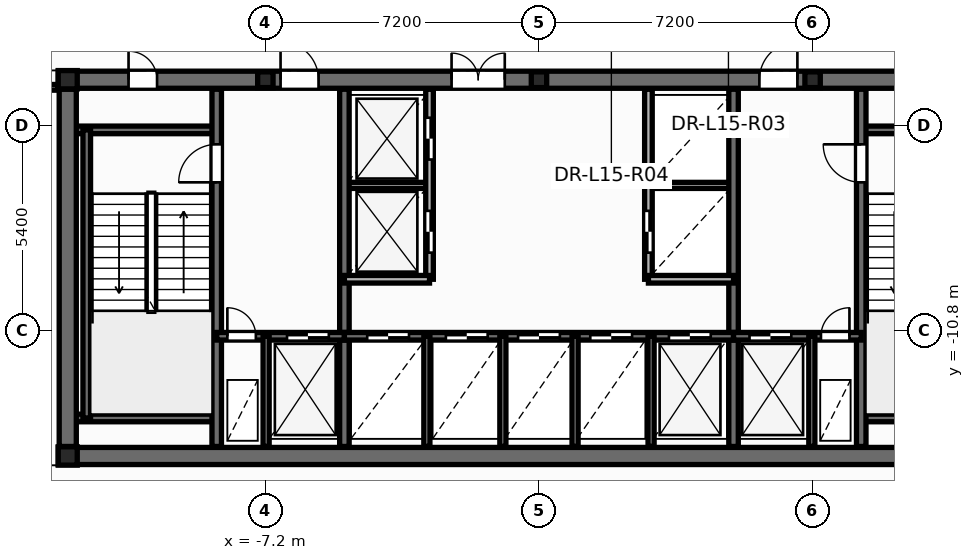
"""IFC4 building model, lengths in metres.
Left out: names, types, materials, properties, quantities, classifications, styles, units other than length and angle.
Written with IfcOpenShell. Run it as: python <this file> out.ifc"""

import sys

from ifc_helpers import new_model, si_unit, direction, frame, frame_2d, origin, origin_2d, place, context, subcontext, project, spatial, rectangle, i_section, extrude, element, fill, save


model = new_model("IFC4")
c1 = context("Model", 3, precision=1e-05, world=origin(), true_north=direction((0.0, 1.0)))
c2 = subcontext(c1, "Body", "Model", "MODEL_VIEW")
j1 = project(units=[si_unit("LENGTHUNIT", "METRE"), si_unit("PLANEANGLEUNIT", "RADIAN")], contexts=[c1])
p1 = place(None, origin())
s1 = spatial("IfcSite", under=j1, at=p1, CompositionType="ELEMENT")
p2 = place(p1, origin())
s2 = spatial("IfcBuilding", under=s1, at=p2, CompositionType="ELEMENT")
p3 = place(p2, frame((0.0, 0.0, 60.3)))
s3 = spatial("IfcBuildingStorey", under=s2, at=p3, CompositionType="ELEMENT", Elevation=60.3)
for number, where, z_axis, x_axis in (
    (1, (-12.4, -14.1, 0.0), (0.0, 0.0, 1.0), (1.0, 0.0, 0.0)),
    (2, (-12.4, -4.2, 0.0), (0.0, 0.0, 1.0), (1.0, 0.0, 0.0)),
):
    element("IfcColumn", number, at=place(p3, frame(where, z_axis=z_axis, x_axis=x_axis)), inside=s3, PredefinedType="COLUMN", context=c2, shape_type="SweptSolid", body=[
        extrude(i_section(OverallWidth=0.5, OverallDepth=0.482, WebThickness=0.04, FlangeThickness=0.045, at=origin_2d()), origin(), (0.0, 0.0, 1.0), 4.5),
    ])
for number, where, z_axis, x_axis in (
    (3, (-7.2, -4.2, 0.0), (0.0, 0.0, 1.0), (1.0, 0.0, 0.0)),
    (4, (0.0, -4.2, 0.0), (0.0, 0.0, 1.0), (1.0, 0.0, 0.0)),
    (5, (7.2, -4.2, 0.0), (0.0, 0.0, 1.0), (1.0, 0.0, 0.0)),
):
    element("IfcColumn", number, at=place(p3, frame(where, z_axis=z_axis, x_axis=x_axis)), inside=s3, PredefinedType="PILASTER", context=c2, shape_type="SweptSolid", body=[
        extrude(i_section(OverallWidth=0.405, OverallDepth=0.414, WebThickness=0.022, FlangeThickness=0.032, at=origin_2d()), origin(), (0.0, 0.0, 1.0), 4.5),
    ])
for number, where, z_axis, x_axis in (
    (6, (-5.12, -6.98, 0.0), (0.0, 0.0, 1.0), (1.0, 0.0, 0.0)),
    (7, (2.88, -6.98, 0.0), (0.0, 0.0, 1.0), (1.0, 0.0, 0.0)),
):
    element("IfcWall", number, at=place(p3, frame(where, z_axis=z_axis, x_axis=x_axis)), inside=s3, PredefinedType="PARTITIONING", context=c2, shape_type="SweptSolid", body=[
        extrude(rectangle(XDim=2.24, YDim=0.16, at=frame_2d((1.12, 0.0))), origin(), (0.0, 0.0, 1.0), 4.25),
    ])
p4 = place(p3, frame((-12.65, -14.1, 0.0), z_axis=(0.0, 0.0, 1.0), x_axis=(1.0, 0.0, 0.0)))
e8 = element("IfcWall", 8, at=p4, inside=s3, PredefinedType="SHEAR", context=c2, shape_type="SweptSolid", body=[
    extrude(rectangle(XDim=25.3, YDim=0.45, at=frame_2d((12.65, 0.0))), origin(), (0.0, 0.0, 1.0), 4.5),
])
p5 = place(p3, frame((-12.65, -4.2, 0.0), z_axis=(0.0, 0.0, 1.0), x_axis=(1.0, 0.0, 0.0)))
e9 = element("IfcWall", 9, at=p5, inside=s3, PredefinedType="SHEAR", context=c2, shape_type="SweptSolid", body=[
    extrude(rectangle(XDim=25.3, YDim=0.45, at=frame_2d((12.65, 0.0))), origin(), (0.0, 0.0, 1.0), 4.5),
])
p6 = place(p5, frame((1.85, 0.0, 0.0)))
e10 = element("IfcOpeningElement", 10, at=p6, cuts=e9, PredefinedType="OPENING", context=c2, shape_type="SweptSolid", body=[
    extrude(rectangle(XDim=0.756, YDim=2.054, at=frame_2d((0.375, 1.027))), frame((0.0, 0.235, 0.0), z_axis=(0.0, -1.0, 0.0), x_axis=(1.0, 0.0, 0.0)), (0.0, 0.0, 1.0), 0.47),
])
p7 = place(p5, frame((22.65, 0.0, 0.0)))
e11 = element("IfcOpeningElement", 11, at=p7, cuts=e9, PredefinedType="OPENING", context=c2, shape_type="SweptSolid", body=[
    extrude(rectangle(XDim=0.756, YDim=2.054, at=frame_2d((0.375, 1.027))), frame((0.0, 0.235, 0.0), z_axis=(0.0, -1.0, 0.0), x_axis=(1.0, 0.0, 0.0)), (0.0, 0.0, 1.0), 0.47),
])
p8 = place(p5, frame((5.85, 0.0, 0.0)))
e12 = element("IfcOpeningElement", 12, at=p8, cuts=e9, PredefinedType="OPENING", context=c2, shape_type="SweptSolid", body=[
    extrude(rectangle(XDim=1.006, YDim=2.104, at=frame_2d((0.5, 1.052))), frame((0.0, 0.235, 0.0), z_axis=(0.0, -1.0, 0.0), x_axis=(1.0, 0.0, 0.0)), (0.0, 0.0, 1.0), 0.47),
])
p9 = place(p5, frame((10.35, 0.0, 0.0)))
e13 = element("IfcOpeningElement", 13, at=p9, cuts=e9, PredefinedType="OPENING", context=c2, shape_type="SweptSolid", body=[
    extrude(rectangle(XDim=1.406, YDim=2.154, at=frame_2d((0.7, 1.077))), frame((0.0, 0.235, 0.0), z_axis=(0.0, -1.0, 0.0), x_axis=(1.0, 0.0, 0.0)), (0.0, 0.0, 1.0), 0.47),
])
p10 = place(p5, frame((18.45, 0.0, 0.0)))
e14 = element("IfcOpeningElement", 14, at=p10, cuts=e9, PredefinedType="OPENING", context=c2, shape_type="SweptSolid", body=[
    extrude(rectangle(XDim=1.006, YDim=2.104, at=frame_2d((0.5, 1.052))), frame((0.0, 0.235, 0.0), z_axis=(0.0, -1.0, 0.0), x_axis=(1.0, 0.0, 0.0)), (0.0, 0.0, 1.0), 0.47),
])
for number, where, z_axis, x_axis in (
    (15, (-12.35, -5.52, 0.0), (0.0, 0.0, 1.0), (1.0, 0.0, 0.0)),
    (16, (-12.35, -13.1, 0.0), (0.0, 0.0, 1.0), (1.0, 0.0, 0.0)),
):
    element("IfcWall", number, at=place(p3, frame(where, z_axis=z_axis, x_axis=x_axis)), inside=s3, PredefinedType="SOLIDWALL", context=c2, shape_type="SweptSolid", body=[
        extrude(rectangle(XDim=3.87, YDim=0.2, at=frame_2d((1.935, 0.0))), origin(), (0.0, 0.0, 1.0), 4.5),
    ])
p11 = place(p3, frame((-11.9, -13.1, 0.0), z_axis=(0.0, 0.0, 1.0), x_axis=(0.0, 1.0, 0.0)))
e17 = element("IfcWall", 17, at=p11, inside=s3, PredefinedType="SOLIDWALL", context=c2, shape_type="SweptSolid", body=[
    extrude(rectangle(XDim=7.58, YDim=0.2, at=frame_2d((3.79, 0.0))), origin(), (0.0, 0.0, 1.0), 4.5),
])
for number, where, z_axis, x_axis in (
    (18, (8.48, -5.52, 0.0), (0.0, 0.0, 1.0), (1.0, 0.0, 0.0)),
    (19, (8.48, -13.1, 0.0), (0.0, 0.0, 1.0), (1.0, 0.0, 0.0)),
):
    element("IfcWall", number, at=place(p3, frame(where, z_axis=z_axis, x_axis=x_axis)), inside=s3, PredefinedType="SOLIDWALL", context=c2, shape_type="SweptSolid", body=[
        extrude(rectangle(XDim=3.87, YDim=0.2, at=frame_2d((1.935, 0.0))), origin(), (0.0, 0.0, 1.0), 4.5),
    ])
p12 = place(p3, frame((-8.48, -13.85, 0.0), z_axis=(0.0, 0.0, 1.0), x_axis=(0.0, 1.0, 0.0)))
e20 = element("IfcWall", 20, at=p12, inside=s3, PredefinedType="SHEAR", context=c2, shape_type="SweptSolid", body=[
    extrude(rectangle(XDim=9.4, YDim=0.25, at=frame_2d((4.7, 0.0))), origin(), (0.0, 0.0, 1.0), 4.5),
])
p13 = place(p12, frame((6.95, 0.0, 0.0)))
e21 = element("IfcOpeningElement", 21, at=p13, cuts=e20, PredefinedType="OPENING", context=c2, shape_type="SweptSolid", body=[
    extrude(rectangle(XDim=1.006, YDim=2.104, at=frame_2d((0.5, 1.052))), frame((0.0, 0.135, 0.0), z_axis=(0.0, -1.0, 0.0), x_axis=(1.0, 0.0, 0.0)), (0.0, 0.0, 1.0), 0.27),
])
p14 = place(p3, frame((8.48, -13.85, 0.0), z_axis=(0.0, 0.0, 1.0), x_axis=(0.0, 1.0, 0.0)))
e22 = element("IfcWall", 22, at=p14, inside=s3, PredefinedType="SHEAR", context=c2, shape_type="SweptSolid", body=[
    extrude(rectangle(XDim=9.4, YDim=0.25, at=frame_2d((4.7, 0.0))), origin(), (0.0, 0.0, 1.0), 4.5),
])
p15 = place(p14, frame((6.95, 0.0, 0.0)))
e23 = element("IfcOpeningElement", 23, at=p15, cuts=e22, PredefinedType="OPENING", context=c2, shape_type="SweptSolid", body=[
    extrude(rectangle(XDim=1.006, YDim=2.104, at=frame_2d((0.5, 1.052))), frame((0.0, 0.135, 0.0), z_axis=(0.0, -1.0, 0.0), x_axis=(1.0, 0.0, 0.0)), (0.0, 0.0, 1.0), 0.27),
])
for number, where, z_axis, x_axis in (
    (24, (-5.12, -13.85, 0.0), (0.0, 0.0, 1.0), (0.0, 1.0, 0.0)),
    (25, (5.12, -13.85, 0.0), (0.0, 0.0, 1.0), (0.0, 1.0, 0.0)),
):
    element("IfcWall", number, at=place(p3, frame(where, z_axis=z_axis, x_axis=x_axis)), inside=s3, PredefinedType="SHEAR", context=c2, shape_type="SweptSolid", body=[
        extrude(rectangle(XDim=9.4, YDim=0.25, at=frame_2d((4.7, 0.0))), origin(), (0.0, 0.0, 1.0), 4.5),
    ])
p16 = place(p3, frame((-8.48, -10.95, 0.0), z_axis=(0.0, 0.0, 1.0), x_axis=(1.0, 0.0, 0.0)))
e26 = element("IfcWall", 26, at=p16, inside=s3, PredefinedType="SOLIDWALL", context=c2, shape_type="SweptSolid", body=[
    extrude(rectangle(XDim=3.36, YDim=0.2, at=frame_2d((1.68, 0.0))), origin(), (0.0, 0.0, 1.0), 4.5),
])
p17 = place(p16, frame((0.28, 0.0, 0.0)))
e27 = element("IfcOpeningElement", 27, at=p17, cuts=e26, PredefinedType="OPENING", context=c2, shape_type="SweptSolid", body=[
    extrude(rectangle(XDim=0.756, YDim=2.054, at=frame_2d((0.375, 1.027))), frame((0.0, 0.11, 0.0), z_axis=(0.0, -1.0, 0.0), x_axis=(1.0, 0.0, 0.0)), (0.0, 0.0, 1.0), 0.22),
])
p18 = place(p16, frame((1.85, 0.0, 0.0)))
e28 = element("IfcOpeningElement", 28, at=p18, cuts=e26, PredefinedType="OPENING", context=c2, shape_type="SweptSolid", body=[
    extrude(rectangle(XDim=1.106, YDim=2.104, at=frame_2d((0.55, 1.052))), frame((0.0, 0.11, 0.0), z_axis=(0.0, -1.0, 0.0), x_axis=(1.0, 0.0, 0.0)), (0.0, 0.0, 1.0), 0.22),
])
p19 = place(p3, frame((-5.12, -10.95, 0.0), z_axis=(0.0, 0.0, 1.0), x_axis=(1.0, 0.0, 0.0)))
e29 = element("IfcWall", 29, at=p19, inside=s3, PredefinedType="SOLIDWALL", context=c2, shape_type="SweptSolid", body=[
    extrude(rectangle(XDim=10.24, YDim=0.2, at=frame_2d((5.12, 0.0))), origin(), (0.0, 0.0, 1.0), 4.5),
])
p20 = place(p19, frame((0.6, 0.0, 0.0)))
e30 = element("IfcOpeningElement", 30, at=p20, cuts=e29, PredefinedType="OPENING", context=c2, shape_type="SweptSolid", body=[
    extrude(rectangle(XDim=1.106, YDim=2.104, at=frame_2d((0.55, 1.052))), frame((0.0, 0.11, 0.0), z_axis=(0.0, -1.0, 0.0), x_axis=(1.0, 0.0, 0.0)), (0.0, 0.0, 1.0), 0.22),
])
p21 = place(p19, frame((2.67, 0.0, 0.0)))
e31 = element("IfcOpeningElement", 31, at=p21, cuts=e29, PredefinedType="OPENING", context=c2, shape_type="SweptSolid", body=[
    extrude(rectangle(XDim=1.106, YDim=2.104, at=frame_2d((0.55, 1.052))), frame((0.0, 0.11, 0.0), z_axis=(0.0, -1.0, 0.0), x_axis=(1.0, 0.0, 0.0)), (0.0, 0.0, 1.0), 0.22),
])
p22 = place(p19, frame((4.57, 0.0, 0.0)))
e32 = element("IfcOpeningElement", 32, at=p22, cuts=e29, PredefinedType="OPENING", context=c2, shape_type="SweptSolid", body=[
    extrude(rectangle(XDim=1.106, YDim=2.104, at=frame_2d((0.55, 1.052))), frame((0.0, 0.11, 0.0), z_axis=(0.0, -1.0, 0.0), x_axis=(1.0, 0.0, 0.0)), (0.0, 0.0, 1.0), 0.22),
])
p23 = place(p19, frame((6.47, 0.0, 0.0)))
e33 = element("IfcOpeningElement", 33, at=p23, cuts=e29, PredefinedType="OPENING", context=c2, shape_type="SweptSolid", body=[
    extrude(rectangle(XDim=1.106, YDim=2.104, at=frame_2d((0.55, 1.052))), frame((0.0, 0.11, 0.0), z_axis=(0.0, -1.0, 0.0), x_axis=(1.0, 0.0, 0.0)), (0.0, 0.0, 1.0), 0.22),
])
p24 = place(p19, frame((8.54, 0.0, 0.0)))
e34 = element("IfcOpeningElement", 34, at=p24, cuts=e29, PredefinedType="OPENING", context=c2, shape_type="SweptSolid", body=[
    extrude(rectangle(XDim=1.106, YDim=2.104, at=frame_2d((0.55, 1.052))), frame((0.0, 0.11, 0.0), z_axis=(0.0, -1.0, 0.0), x_axis=(1.0, 0.0, 0.0)), (0.0, 0.0, 1.0), 0.22),
])
p25 = place(p3, frame((5.12, -10.95, 0.0), z_axis=(0.0, 0.0, 1.0), x_axis=(1.0, 0.0, 0.0)))
e35 = element("IfcWall", 35, at=p25, inside=s3, PredefinedType="SOLIDWALL", context=c2, shape_type="SweptSolid", body=[
    extrude(rectangle(XDim=3.36, YDim=0.2, at=frame_2d((1.68, 0.0))), origin(), (0.0, 0.0, 1.0), 4.5),
])
p26 = place(p25, frame((0.42, 0.0, 0.0)))
e36 = element("IfcOpeningElement", 36, at=p26, cuts=e35, PredefinedType="OPENING", context=c2, shape_type="SweptSolid", body=[
    extrude(rectangle(XDim=1.106, YDim=2.104, at=frame_2d((0.55, 1.052))), frame((0.0, 0.11, 0.0), z_axis=(0.0, -1.0, 0.0), x_axis=(1.0, 0.0, 0.0)), (0.0, 0.0, 1.0), 0.22),
])
p27 = place(p25, frame((2.3, 0.0, 0.0)))
e37 = element("IfcOpeningElement", 37, at=p27, cuts=e35, PredefinedType="OPENING", context=c2, shape_type="SweptSolid", body=[
    extrude(rectangle(XDim=0.756, YDim=2.054, at=frame_2d((0.375, 1.027))), frame((0.0, 0.11, 0.0), z_axis=(0.0, -1.0, 0.0), x_axis=(1.0, 0.0, 0.0)), (0.0, 0.0, 1.0), 0.22),
])
for number, where, z_axis, x_axis in (
    (38, (-7.18, -13.85, 0.0), (0.0, 0.0, 1.0), (0.0, 1.0, 0.0)),
    (39, (7.18, -13.85, 0.0), (0.0, 0.0, 1.0), (0.0, 1.0, 0.0)),
    (40, (-2.95, -13.85, 0.0), (0.0, 0.0, 1.0), (0.0, 1.0, 0.0)),
    (41, (2.95, -13.85, 0.0), (0.0, 0.0, 1.0), (0.0, 1.0, 0.0)),
):
    element("IfcWall", number, at=place(p3, frame(where, z_axis=z_axis, x_axis=x_axis)), inside=s3, PredefinedType="PARTITIONING", context=c2, shape_type="SweptSolid", body=[
        extrude(rectangle(XDim=2.9, YDim=0.16, at=frame_2d((1.45, 0.0))), origin(), (0.0, 0.0, 1.0), 3.275),
    ])
p28 = place(p3, frame((-12.4, -13.85, 0.0), z_axis=(0.0, 0.0, 1.0), x_axis=(0.0, 1.0, 0.0)))
e42 = element("IfcWall", 42, at=p28, inside=s3, PredefinedType="SHEAR", context=c2, shape_type="SweptSolid", body=[
    extrude(rectangle(XDim=9.4, YDim=0.45, at=frame_2d((4.7, 0.0))), origin(), (0.0, 0.0, 1.0), 4.5),
])
p29 = place(p3, frame((-2.88, -9.45, 0.0), z_axis=(0.0, 0.0, 1.0), x_axis=(0.0, 1.0, 0.0)))
e43 = element("IfcWall", 43, at=p29, inside=s3, PredefinedType="SOLIDWALL", context=c2, shape_type="SweptSolid", body=[
    extrude(rectangle(XDim=5.0, YDim=0.2, at=frame_2d((2.5, 0.0))), origin(), (0.0, 0.0, 1.0), 4.25),
])
p30 = place(p29, frame((0.7, 0.0, 0.0)))
e44 = element("IfcOpeningElement", 44, at=p30, cuts=e43, PredefinedType="OPENING", context=c2, shape_type="SweptSolid", body=[
    extrude(rectangle(XDim=1.106, YDim=2.104, at=frame_2d((0.55, 1.052))), frame((0.0, 0.11, 0.0), z_axis=(0.0, -1.0, 0.0), x_axis=(1.0, 0.0, 0.0)), (0.0, 0.0, 1.0), 0.22),
])
p31 = place(p29, frame((3.15, 0.0, 0.0)))
e45 = element("IfcOpeningElement", 45, at=p31, cuts=e43, PredefinedType="OPENING", context=c2, shape_type="SweptSolid", body=[
    extrude(rectangle(XDim=1.106, YDim=2.104, at=frame_2d((0.55, 1.052))), frame((0.0, 0.11, 0.0), z_axis=(0.0, -1.0, 0.0), x_axis=(1.0, 0.0, 0.0)), (0.0, 0.0, 1.0), 0.22),
])
p32 = place(p3, frame((-5.12, -9.45, 0.0), z_axis=(0.0, 0.0, 1.0), x_axis=(1.0, 0.0, 0.0)))
e46 = element("IfcWall", 46, at=p32, inside=s3, PredefinedType="SOLIDWALL", context=c2, shape_type="SweptSolid", body=[
    extrude(rectangle(XDim=2.24, YDim=0.2, at=frame_2d((1.12, 0.0))), origin(), (0.0, 0.0, 1.0), 4.25),
])
p33 = place(p3, frame((2.88, -9.45, 0.0), z_axis=(0.0, 0.0, 1.0), x_axis=(0.0, 1.0, 0.0)))
e47 = element("IfcWall", 47, at=p33, inside=s3, PredefinedType="SOLIDWALL", context=c2, shape_type="SweptSolid", body=[
    extrude(rectangle(XDim=5.0, YDim=0.2, at=frame_2d((2.5, 0.0))), origin(), (0.0, 0.0, 1.0), 4.25),
])
p34 = place(p33, frame((0.7, 0.0, 0.0)))
e48 = element("IfcOpeningElement", 48, at=p34, cuts=e47, PredefinedType="OPENING", context=c2, shape_type="SweptSolid", body=[
    extrude(rectangle(XDim=1.106, YDim=2.104, at=frame_2d((0.55, 1.052))), frame((0.0, 0.11, 0.0), z_axis=(0.0, -1.0, 0.0), x_axis=(1.0, 0.0, 0.0)), (0.0, 0.0, 1.0), 0.22),
])
p35 = place(p3, frame((2.88, -9.45, 0.0), z_axis=(0.0, 0.0, 1.0), x_axis=(1.0, 0.0, 0.0)))
e49 = element("IfcWall", 49, at=p35, inside=s3, PredefinedType="SOLIDWALL", context=c2, shape_type="SweptSolid", body=[
    extrude(rectangle(XDim=2.24, YDim=0.2, at=frame_2d((1.12, 0.0))), origin(), (0.0, 0.0, 1.0), 4.25),
])
for number, where, z_axis, x_axis in (
    (50, (-0.95, -13.85, 0.0), (0.0, 0.0, 1.0), (0.0, 1.0, 0.0)),
    (51, (0.95, -13.85, 0.0), (0.0, 0.0, 1.0), (0.0, 1.0, 0.0)),
):
    element("IfcWall", number, at=place(p3, frame(where, z_axis=z_axis, x_axis=x_axis)), inside=s3, PredefinedType="PARTITIONING", context=c2, shape_type="SweptSolid", body=[
        extrude(rectangle(XDim=2.9, YDim=0.16, at=frame_2d((1.45, 0.0))), origin(), (0.0, 0.0, 1.0), 3.275),
    ])
p36 = place(p3, frame((-15.2, -4.4, 0.0), z_axis=(0.0, 0.0, 1.0), x_axis=(1.0, 0.0, 0.0)))
e52 = element("IfcWall", 52, at=p36, inside=s3, PredefinedType="PARTITIONING", context=c2, shape_type="SweptSolid", body=[
    extrude(rectangle(XDim=2.548, YDim=0.15, at=frame_2d((1.274, 0.0))), origin(), (0.0, 0.0, 1.0), 3.225),
])
p37 = place(p30, origin())
e53 = element("IfcDoor", 53, at=p37, inside=s3, OperationType="DOUBLE_DOOR_SLIDING", PredefinedType="DOOR", context=c2, shape_type="SweptSolid", body=[
    extrude(rectangle(XDim=1.1, YDim=2.1, at=frame_2d((0.55, 1.05))), frame((0.0, 0.025, 0.0), z_axis=(0.0, -1.0, 0.0), x_axis=(1.0, 0.0, 0.0)), (0.0, 0.0, 1.0), 0.05),
])
fill(e44, e53)
p38 = place(p31, origin())
e54 = element("IfcDoor", 54, at=p38, inside=s3, OperationType="DOUBLE_DOOR_SLIDING", PredefinedType="DOOR", context=c2, shape_type="SweptSolid", body=[
    extrude(rectangle(XDim=1.1, YDim=2.1, at=frame_2d((0.55, 1.05))), frame((0.0, 0.025, 0.0), z_axis=(0.0, -1.0, 0.0), x_axis=(1.0, 0.0, 0.0)), (0.0, 0.0, 1.0), 0.05),
])
fill(e45, e54)
p39 = place(p34, origin())
e55 = element("IfcDoor", 55, at=p39, inside=s3, OperationType="DOUBLE_DOOR_SLIDING", PredefinedType="DOOR", context=c2, shape_type="SweptSolid", body=[
    extrude(rectangle(XDim=1.1, YDim=2.1, at=frame_2d((0.55, 1.05))), frame((0.0, 0.025, 0.0), z_axis=(0.0, -1.0, 0.0), x_axis=(1.0, 0.0, 0.0)), (0.0, 0.0, 1.0), 0.05),
])
fill(e48, e55)
p40 = place(p13, origin())
e56 = element("IfcDoor", 56, at=p40, inside=s3, OperationType="SINGLE_SWING_LEFT", PredefinedType="DOOR", context=c2, shape_type="SweptSolid", body=[
    extrude(rectangle(XDim=1.0, YDim=2.1, at=frame_2d((0.5, 1.05))), frame((0.0, 0.025, 0.0), z_axis=(0.0, -1.0, 0.0), x_axis=(1.0, 0.0, 0.0)), (0.0, 0.0, 1.0), 0.05),
])
fill(e21, e56)
p41 = place(p15, origin())
e57 = element("IfcDoor", 57, at=p41, inside=s3, OperationType="SINGLE_SWING_RIGHT", PredefinedType="DOOR", context=c2, shape_type="SweptSolid", body=[
    extrude(rectangle(XDim=1.0, YDim=2.1, at=frame_2d((0.5, 1.05))), frame((0.0, 0.025, 0.0), z_axis=(0.0, -1.0, 0.0), x_axis=(1.0, 0.0, 0.0)), (0.0, 0.0, 1.0), 0.05),
])
fill(e23, e57)
p42 = place(p17, origin())
e58 = element("IfcDoor", 58, at=p42, inside=s3, OperationType="SINGLE_SWING_LEFT", PredefinedType="DOOR", context=c2, shape_type="SweptSolid", body=[
    extrude(rectangle(XDim=0.75, YDim=2.05, at=frame_2d((0.375, 1.025))), frame((0.0, 0.025, 0.0), z_axis=(0.0, -1.0, 0.0), x_axis=(1.0, 0.0, 0.0)), (0.0, 0.0, 1.0), 0.05),
])
fill(e27, e58)
p43 = place(p18, origin())
e59 = element("IfcDoor", 59, at=p43, inside=s3, OperationType="DOUBLE_DOOR_SLIDING", PredefinedType="DOOR", context=c2, shape_type="SweptSolid", body=[
    extrude(rectangle(XDim=1.1, YDim=2.1, at=frame_2d((0.55, 1.05))), frame((0.0, 0.025, 0.0), z_axis=(0.0, -1.0, 0.0), x_axis=(1.0, 0.0, 0.0)), (0.0, 0.0, 1.0), 0.05),
])
fill(e28, e59)
p44 = place(p26, origin())
e60 = element("IfcDoor", 60, at=p44, inside=s3, OperationType="DOUBLE_DOOR_SLIDING", PredefinedType="DOOR", context=c2, shape_type="SweptSolid", body=[
    extrude(rectangle(XDim=1.1, YDim=2.1, at=frame_2d((0.55, 1.05))), frame((0.0, 0.025, 0.0), z_axis=(0.0, -1.0, 0.0), x_axis=(1.0, 0.0, 0.0)), (0.0, 0.0, 1.0), 0.05),
])
fill(e36, e60)
p45 = place(p27, origin())
e61 = element("IfcDoor", 61, at=p45, inside=s3, OperationType="SINGLE_SWING_RIGHT", PredefinedType="DOOR", context=c2, shape_type="SweptSolid", body=[
    extrude(rectangle(XDim=0.75, YDim=2.05, at=frame_2d((0.375, 1.025))), frame((0.0, 0.025, 0.0), z_axis=(0.0, -1.0, 0.0), x_axis=(1.0, 0.0, 0.0)), (0.0, 0.0, 1.0), 0.05),
])
fill(e37, e61)
p46 = place(p20, origin())
e62 = element("IfcDoor", 62, at=p46, inside=s3, OperationType="DOUBLE_DOOR_SLIDING", PredefinedType="DOOR", context=c2, shape_type="SweptSolid", body=[
    extrude(rectangle(XDim=1.1, YDim=2.1, at=frame_2d((0.55, 1.05))), frame((0.0, 0.025, 0.0), z_axis=(0.0, -1.0, 0.0), x_axis=(1.0, 0.0, 0.0)), (0.0, 0.0, 1.0), 0.05),
])
fill(e30, e62)
p47 = place(p21, origin())
e63 = element("IfcDoor", 63, at=p47, inside=s3, OperationType="DOUBLE_DOOR_SLIDING", PredefinedType="DOOR", context=c2, shape_type="SweptSolid", body=[
    extrude(rectangle(XDim=1.1, YDim=2.1, at=frame_2d((0.55, 1.05))), frame((0.0, 0.025, 0.0), z_axis=(0.0, -1.0, 0.0), x_axis=(1.0, 0.0, 0.0)), (0.0, 0.0, 1.0), 0.05),
])
fill(e31, e63)
p48 = place(p22, origin())
e64 = element("IfcDoor", 64, at=p48, inside=s3, OperationType="DOUBLE_DOOR_SLIDING", PredefinedType="DOOR", context=c2, shape_type="SweptSolid", body=[
    extrude(rectangle(XDim=1.1, YDim=2.1, at=frame_2d((0.55, 1.05))), frame((0.0, 0.025, 0.0), z_axis=(0.0, -1.0, 0.0), x_axis=(1.0, 0.0, 0.0)), (0.0, 0.0, 1.0), 0.05),
])
fill(e32, e64)
p49 = place(p23, origin())
e65 = element("IfcDoor", 65, at=p49, inside=s3, OperationType="DOUBLE_DOOR_SLIDING", PredefinedType="DOOR", context=c2, shape_type="SweptSolid", body=[
    extrude(rectangle(XDim=1.1, YDim=2.1, at=frame_2d((0.55, 1.05))), frame((0.0, 0.025, 0.0), z_axis=(0.0, -1.0, 0.0), x_axis=(1.0, 0.0, 0.0)), (0.0, 0.0, 1.0), 0.05),
])
fill(e33, e65)
p50 = place(p24, origin())
e66 = element("IfcDoor", 66, at=p50, inside=s3, OperationType="DOUBLE_DOOR_SLIDING", PredefinedType="DOOR", context=c2, shape_type="SweptSolid", body=[
    extrude(rectangle(XDim=1.1, YDim=2.1, at=frame_2d((0.55, 1.05))), frame((0.0, 0.025, 0.0), z_axis=(0.0, -1.0, 0.0), x_axis=(1.0, 0.0, 0.0)), (0.0, 0.0, 1.0), 0.05),
])
fill(e34, e66)
p51 = place(p6, origin())
e67 = element("IfcDoor", 67, at=p51, inside=s3, OperationType="SINGLE_SWING_LEFT", PredefinedType="DOOR", context=c2, shape_type="SweptSolid", body=[
    extrude(rectangle(XDim=0.75, YDim=2.05, at=frame_2d((0.375, 1.025))), frame((0.0, 0.025, 0.0), z_axis=(0.0, -1.0, 0.0), x_axis=(1.0, 0.0, 0.0)), (0.0, 0.0, 1.0), 0.05),
])
fill(e10, e67)
p52 = place(p8, origin())
e68 = element("IfcDoor", 68, at=p52, inside=s3, OperationType="SINGLE_SWING_LEFT", PredefinedType="DOOR", context=c2, shape_type="SweptSolid", body=[
    extrude(rectangle(XDim=1.0, YDim=2.1, at=frame_2d((0.5, 1.05))), frame((0.0, 0.025, 0.0), z_axis=(0.0, -1.0, 0.0), x_axis=(1.0, 0.0, 0.0)), (0.0, 0.0, 1.0), 0.05),
])
fill(e12, e68)
p53 = place(p9, origin())
e69 = element("IfcDoor", 69, at=p53, inside=s3, OperationType="DOUBLE_DOOR_SINGLE_SWING", PredefinedType="DOOR", context=c2, shape_type="SweptSolid", body=[
    extrude(rectangle(XDim=1.4, YDim=2.15, at=frame_2d((0.7, 1.075))), frame((0.0, 0.025, 0.0), z_axis=(0.0, -1.0, 0.0), x_axis=(1.0, 0.0, 0.0)), (0.0, 0.0, 1.0), 0.05),
])
fill(e13, e69)
p54 = place(p10, origin())
e70 = element("IfcDoor", 70, at=p54, inside=s3, OperationType="SINGLE_SWING_RIGHT", PredefinedType="DOOR", context=c2, shape_type="SweptSolid", body=[
    extrude(rectangle(XDim=1.0, YDim=2.1, at=frame_2d((0.5, 1.05))), frame((0.0, 0.025, 0.0), z_axis=(0.0, -1.0, 0.0), x_axis=(1.0, 0.0, 0.0)), (0.0, 0.0, 1.0), 0.05),
])
fill(e14, e70)
save(model, sys.argv[1])
